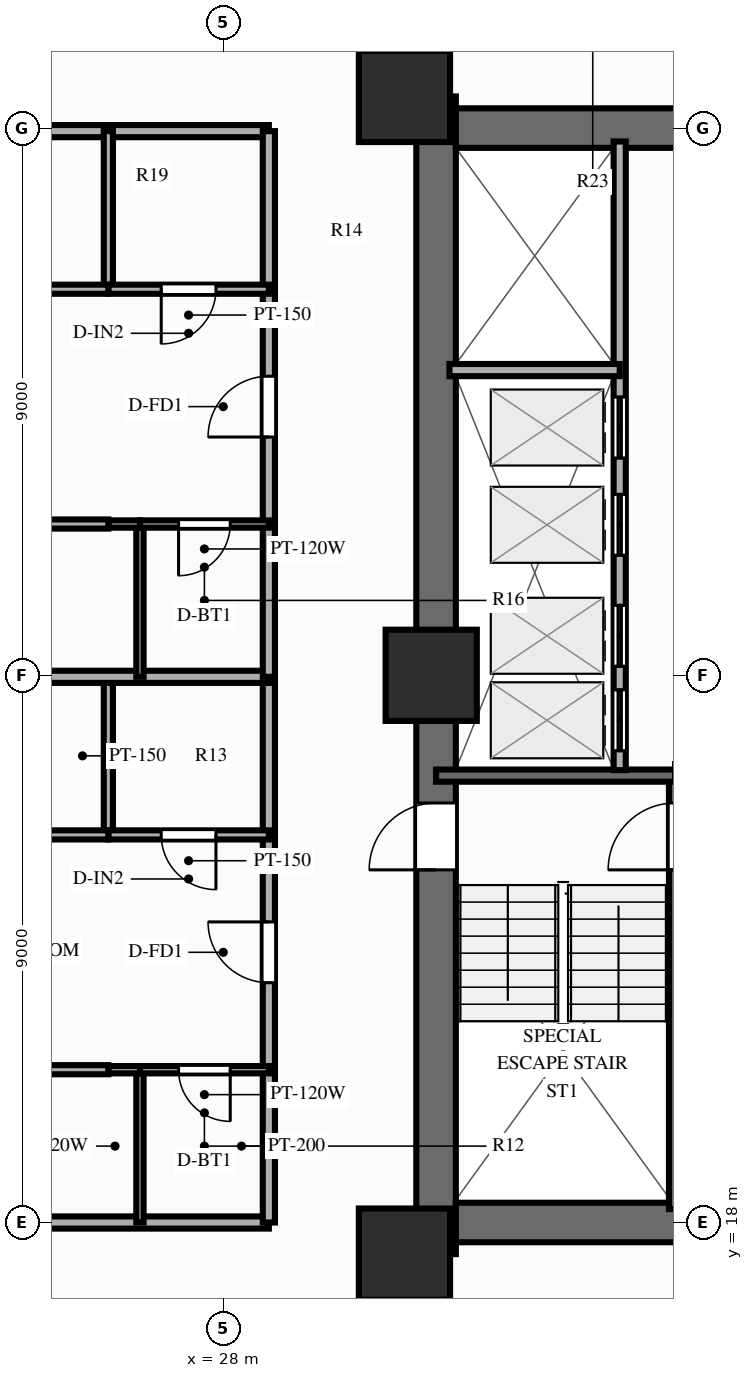
"""IFC4 building model, lengths in metres.
Left out: names, types, materials, properties, quantities, classifications, styles, units other than length and angle.
Written with IfcOpenShell. Run it as: python <this file> out.ifc"""

import sys

from ifc_helpers import new_model, si_unit, direction, frame, frame_2d, origin, origin_2d, place, context, subcontext, project, spatial, rectangle, extrude, source, transform, mapped, element, fill, save


model = new_model("IFC4")
c1 = context("Model", 3, precision=1e-05, world=origin(), true_north=direction((0.0, 1.0)))
c2 = subcontext(c1, "Body", "Model", "MODEL_VIEW")
j1 = project(units=[si_unit("LENGTHUNIT", "METRE"), si_unit("PLANEANGLEUNIT", "RADIAN")], contexts=[c1])
p1 = place(None, origin())
s1 = spatial("IfcSite", under=j1, at=p1, CompositionType="ELEMENT")
p2 = place(p1, origin())
s2 = spatial("IfcBuilding", under=s1, at=p2, CompositionType="ELEMENT")
p3 = place(p2, frame((0.0, 0.0, 49.4)))
s3 = spatial("IfcBuildingStorey", under=s2, at=p3, CompositionType="ELEMENT", Elevation=49.4)
p4 = place(p3, frame((31.5, 17.48, 0.0), z_axis=(0.0, 0.0, 1.0), x_axis=(0.0, 1.0, 0.0)))
e1 = element("IfcWall", 1, at=p4, inside=s3, PredefinedType="SHEAR", context=c2, shape_type="SweptSolid", body=[
    extrude(rectangle(XDim=19.04, YDim=0.65, at=frame_2d((9.52, 0.0))), origin(), (0.0, 0.0, 1.0), 3.0),
])
p5 = place(p4, frame((6.32, 0.0, 0.0)))
e2 = element("IfcOpeningElement", 2, at=p5, cuts=e1, PredefinedType="OPENING", context=c2, shape_type="SweptSolid", body=[
    extrude(rectangle(XDim=1.1, YDim=2.15, at=frame_2d((0.55, 1.075))), frame((0.0, 0.337, 0.0), z_axis=(0.0, -1.0, 0.0), x_axis=(1.0, 0.0, 0.0)), (0.0, 0.0, 1.0), 0.674),
])
p6 = place(p3, frame((31.825, 18.0, 0.0), z_axis=(0.0, 0.0, 1.0), x_axis=(1.0, 0.0, 0.0)))
e3 = element("IfcWall", 3, at=p6, inside=s3, PredefinedType="SHEAR", context=c2, shape_type="SweptSolid", body=[
    extrude(rectangle(XDim=12.35, YDim=0.65, at=frame_2d((6.175, 0.0))), origin(), (0.0, 0.0, 1.0), 3.0),
])
p7 = place(p3, frame((31.825, 36.0, 0.0), z_axis=(0.0, 0.0, 1.0), x_axis=(1.0, 0.0, 0.0)))
e4 = element("IfcWall", 4, at=p7, inside=s3, PredefinedType="SHEAR", context=c2, shape_type="SweptSolid", body=[
    extrude(rectangle(XDim=12.35, YDim=0.65, at=frame_2d((6.175, 0.0))), origin(), (0.0, 0.0, 1.0), 3.0),
])
p8 = place(p7, frame((5.125, 0.0, 0.0), z_axis=(0.0, 0.0, 1.0), x_axis=(-1.0, 0.0, 0.0)))
e5 = element("IfcOpeningElement", 5, at=p8, cuts=e4, PredefinedType="OPENING", context=c2, shape_type="SweptSolid", body=[
    extrude(rectangle(XDim=1.4, YDim=2.15, at=frame_2d((0.7, 1.075))), frame((0.0, 0.337, 0.0), z_axis=(0.0, -1.0, 0.0), x_axis=(1.0, 0.0, 0.0)), (0.0, 0.0, 1.0), 0.674),
])
m1 = source(origin(), c2, "Body", "SweptSolid", [
    extrude(rectangle(XDim=1.5, YDim=1.5, at=origin_2d()), origin(), (0.0, 0.0, 1.0), 3.0),
])
for number, where, z_axis, x_axis in (
    (6, (30.98, 17.48, 0.0), (0.0, 0.0, 1.0), (1.0, 0.0, 0.0)),
    (7, (30.98, 36.52, 0.0), (0.0, 0.0, 1.0), (1.0, 0.0, 0.0)),
    (8, (31.42, 27.0, 0.0), (0.0, 0.0, 1.0), (1.0, 0.0, 0.0)),
):
    element("IfcColumn", number, at=place(p3, frame(where, z_axis=z_axis, x_axis=x_axis)), inside=s3, PredefinedType="COLUMN", context=c2, shape_type="MappedRepresentation", body=[
        mapped(m1, transform((0.0, 0.0, 0.0), scale=1.0)),
    ])
p9 = place(p3, frame((35.43, 18.22, 0.0), z_axis=(0.0, 0.0, 1.0), x_axis=(0.0, 1.0, 0.0)))
e9 = element("IfcWall", 9, at=p9, inside=s3, PredefinedType="SOLIDWALL", context=c2, shape_type="SweptSolid", body=[
    extrude(rectangle(XDim=7.22, YDim=0.2, at=frame_2d((3.61, 0.0))), origin(), (0.0, 0.0, 1.0), 2.79),
])
p10 = place(p9, frame((6.68, 0.0, 0.0), z_axis=(0.0, 0.0, 1.0), x_axis=(-1.0, 0.0, 0.0)))
e10 = element("IfcOpeningElement", 10, at=p10, cuts=e9, PredefinedType="OPENING", context=c2, shape_type="SweptSolid", body=[
    extrude(rectangle(XDim=1.1, YDim=2.15, at=frame_2d((0.55, 1.075))), frame((0.0, 0.112, 0.0), z_axis=(0.0, -1.0, 0.0), x_axis=(1.0, 0.0, 0.0)), (0.0, 0.0, 1.0), 0.224),
])
p11 = place(p3, frame((31.5, 25.35, 0.0), z_axis=(0.0, 0.0, 1.0), x_axis=(1.0, 0.0, 0.0)))
e11 = element("IfcWall", 11, at=p11, inside=s3, PredefinedType="SOLIDWALL", context=c2, shape_type="SweptSolid", body=[
    extrude(rectangle(XDim=3.93, YDim=0.2, at=frame_2d((1.965, 0.0))), origin(), (0.0, 0.0, 1.0), 2.79),
])
p12 = place(p3, frame((34.52, 25.44, 0.0), z_axis=(0.0, 0.0, 1.0), x_axis=(0.0, 1.0, 0.0)))
e12 = element("IfcWall", 12, at=p12, inside=s3, PredefinedType="PARTITIONING", context=c2, shape_type="SweptSolid", body=[
    extrude(rectangle(XDim=10.34, YDim=0.2, at=frame_2d((5.17, 0.0))), origin(), (0.0, 0.0, 1.0), 2.79),
])
p13 = place(p12, frame((0.32, 0.0, 0.0)))
e13 = element("IfcOpeningElement", 13, at=p13, cuts=e12, PredefinedType="OPENING", context=c2, shape_type="SweptSolid", body=[
    extrude(rectangle(XDim=1.0, YDim=2.15, at=frame_2d((0.5, 1.075))), frame((0.0, 0.112, 0.0), z_axis=(0.0, -1.0, 0.0), x_axis=(1.0, 0.0, 0.0)), (0.0, 0.0, 1.0), 0.224),
])
p14 = place(p12, frame((1.71, 0.0, 0.0)))
e14 = element("IfcOpeningElement", 14, at=p14, cuts=e12, PredefinedType="OPENING", context=c2, shape_type="SweptSolid", body=[
    extrude(rectangle(XDim=1.0, YDim=2.15, at=frame_2d((0.5, 1.075))), frame((0.0, 0.112, 0.0), z_axis=(0.0, -1.0, 0.0), x_axis=(1.0, 0.0, 0.0)), (0.0, 0.0, 1.0), 0.224),
])
p15 = place(p12, frame((3.535, 0.0, 0.0)))
e15 = element("IfcOpeningElement", 15, at=p15, cuts=e12, PredefinedType="OPENING", context=c2, shape_type="SweptSolid", body=[
    extrude(rectangle(XDim=1.0, YDim=2.15, at=frame_2d((0.5, 1.075))), frame((0.0, 0.112, 0.0), z_axis=(0.0, -1.0, 0.0), x_axis=(1.0, 0.0, 0.0)), (0.0, 0.0, 1.0), 0.224),
])
p16 = place(p12, frame((5.135, 0.0, 0.0)))
e16 = element("IfcOpeningElement", 16, at=p16, cuts=e12, PredefinedType="OPENING", context=c2, shape_type="SweptSolid", body=[
    extrude(rectangle(XDim=1.0, YDim=2.15, at=frame_2d((0.5, 1.075))), frame((0.0, 0.112, 0.0), z_axis=(0.0, -1.0, 0.0), x_axis=(1.0, 0.0, 0.0)), (0.0, 0.0, 1.0), 0.224),
])
p17 = place(p3, frame((31.72, 32.02, 0.0), z_axis=(0.0, 0.0, 1.0), x_axis=(1.0, 0.0, 0.0)))
e17 = element("IfcWall", 17, at=p17, inside=s3, PredefinedType="PARTITIONING", context=c2, shape_type="SweptSolid", body=[
    extrude(rectangle(XDim=2.8, YDim=0.2, at=frame_2d((1.4, 0.0))), origin(), (0.0, 0.0, 1.0), 2.79),
])
for number, where, z_axis, x_axis in (
    (18, (28.75, 18.0, 0.0), (0.0, 0.0, 1.0), (-1.0, 0.0, 0.0)),
    (19, (28.75, 35.95, 0.0), (0.0, 0.0, 1.0), (-1.0, 0.0, 0.0)),
):
    element("IfcWall", number, at=place(p3, frame(where, z_axis=z_axis, x_axis=x_axis)), inside=s3, PredefinedType="PARTITIONING", context=c2, shape_type="SweptSolid", body=[
        extrude(rectangle(XDim=16.6, YDim=0.2, at=frame_2d((8.3, 0.0))), origin(), (0.0, 0.0, 1.0), 2.24),
    ])
p18 = place(p3, frame((28.75, 18.0, 0.0), z_axis=(0.0, 0.0, 1.0), x_axis=(0.0, 1.0, 0.0)))
e20 = element("IfcWall", 20, at=p18, inside=s3, PredefinedType="PARTITIONING", context=c2, shape_type="SweptSolid", body=[
    extrude(rectangle(XDim=2.513, YDim=0.2, at=frame_2d((1.256, 0.0))), origin(), (0.0, 0.0, 1.0), 2.79),
])
p19 = place(p3, frame((28.75, 20.513, 0.0), z_axis=(0.0, 0.0, 1.0), x_axis=(0.0, 1.0, 0.0)))
e21 = element("IfcWall", 21, at=p19, inside=s3, PredefinedType="PARTITIONING", context=c2, shape_type="SweptSolid", body=[
    extrude(rectangle(XDim=3.862, YDim=0.2, at=frame_2d((1.931, 0.0))), origin(), (0.0, 0.0, 1.0), 2.79),
])
p20 = place(p19, frame((1.431, 0.0, 0.0)))
e22 = element("IfcOpeningElement", 22, at=p20, cuts=e21, PredefinedType="OPENING", context=c2, shape_type="SweptSolid", body=[
    extrude(rectangle(XDim=1.0, YDim=2.15, at=frame_2d((0.5, 1.075))), frame((0.0, 0.112, 0.0), z_axis=(0.0, -1.0, 0.0), x_axis=(1.0, 0.0, 0.0)), (0.0, 0.0, 1.0), 0.224),
])
p21 = place(p3, frame((28.75, 24.375, 0.0), z_axis=(0.0, 0.0, 1.0), x_axis=(0.0, 1.0, 0.0)))
e23 = element("IfcWall", 23, at=p21, inside=s3, PredefinedType="PARTITIONING", context=c2, shape_type="SweptSolid", body=[
    extrude(rectangle(XDim=2.6, YDim=0.2, at=frame_2d((1.3, 0.0))), origin(), (0.0, 0.0, 1.0), 2.79),
])
p22 = place(p3, frame((26.63, 18.0, 0.0), z_axis=(0.0, 0.0, 1.0), x_axis=(0.0, 1.0, 0.0)))
e24 = element("IfcWall", 24, at=p22, inside=s3, PredefinedType="PARTITIONING", context=c2, shape_type="SweptSolid", body=[
    extrude(rectangle(XDim=2.513, YDim=0.12, at=frame_2d((1.256, 0.0))), origin(), (0.0, 0.0, 1.0), 2.79),
])
p23 = place(p3, frame((26.11, 24.375, 0.0), z_axis=(0.0, 0.0, 1.0), x_axis=(0.0, 1.0, 0.0)))
e25 = element("IfcWall", 25, at=p23, inside=s3, PredefinedType="PARTITIONING", context=c2, shape_type="SweptSolid", body=[
    extrude(rectangle(XDim=2.6, YDim=0.15, at=frame_2d((1.3, 0.0))), origin(), (0.0, 0.0, 1.0), 2.79),
])
p24 = place(p3, frame((28.75, 20.513, 0.0), z_axis=(0.0, 0.0, 1.0), x_axis=(-1.0, 0.0, 0.0)))
e26 = element("IfcWall", 26, at=p24, inside=s3, PredefinedType="PARTITIONING", context=c2, shape_type="SweptSolid", body=[
    extrude(rectangle(XDim=2.12, YDim=0.12, at=frame_2d((1.06, 0.0))), origin(), (0.0, 0.0, 1.0), 2.79),
])
p25 = place(p24, frame((0.635, 0.0, 0.0)))
e27 = element("IfcOpeningElement", 27, at=p25, cuts=e26, PredefinedType="OPENING", context=c2, shape_type="SweptSolid", body=[
    extrude(rectangle(XDim=0.85, YDim=2.05, at=frame_2d((0.425, 1.025))), frame((0.0, 0.072, 0.0), z_axis=(0.0, -1.0, 0.0), x_axis=(1.0, 0.0, 0.0)), (0.0, 0.0, 1.0), 0.144),
])
p26 = place(p3, frame((26.63, 20.513, 0.0), z_axis=(0.0, 0.0, 1.0), x_axis=(-1.0, 0.0, 0.0)))
e28 = element("IfcWall", 28, at=p26, inside=s3, PredefinedType="PARTITIONING", context=c2, shape_type="SweptSolid", body=[
    extrude(rectangle(XDim=0.52, YDim=0.12, at=frame_2d((0.26, 0.0))), origin(), (0.0, 0.0, 1.0), 2.79),
])
p27 = place(p3, frame((26.11, 20.513, 0.0), z_axis=(0.0, 0.0, 1.0), x_axis=(-1.0, 0.0, 0.0)))
e29 = element("IfcWall", 29, at=p27, inside=s3, PredefinedType="PARTITIONING", context=c2, shape_type="SweptSolid", body=[
    extrude(rectangle(XDim=13.96, YDim=0.15, at=frame_2d((6.98, 0.0))), origin(), (0.0, 0.0, 1.0), 2.79),
])
p28 = place(p27, frame((6.006, 0.0, 0.0)))
e30 = element("IfcOpeningElement", 30, at=p28, cuts=e29, PredefinedType="OPENING", context=c2, shape_type="SweptSolid", body=[
    extrude(rectangle(XDim=0.9, YDim=2.1, at=frame_2d((0.45, 1.05))), frame((0.0, 0.087, 0.0), z_axis=(0.0, -1.0, 0.0), x_axis=(1.0, 0.0, 0.0)), (0.0, 0.0, 1.0), 0.174),
])
p29 = place(p3, frame((28.75, 24.375, 0.0), z_axis=(0.0, 0.0, 1.0), x_axis=(-1.0, 0.0, 0.0)))
e31 = element("IfcWall", 31, at=p29, inside=s3, PredefinedType="PARTITIONING", context=c2, shape_type="SweptSolid", body=[
    extrude(rectangle(XDim=2.64, YDim=0.15, at=frame_2d((1.32, 0.0))), origin(), (0.0, 0.0, 1.0), 2.79),
])
p30 = place(p29, frame((0.87, 0.0, 0.0)))
e32 = element("IfcOpeningElement", 32, at=p30, cuts=e31, PredefinedType="OPENING", context=c2, shape_type="SweptSolid", body=[
    extrude(rectangle(XDim=0.9, YDim=2.1, at=frame_2d((0.45, 1.05))), frame((0.0, 0.087, 0.0), z_axis=(0.0, -1.0, 0.0), x_axis=(1.0, 0.0, 0.0)), (0.0, 0.0, 1.0), 0.174),
])
p31 = place(p3, frame((26.11, 24.375, 0.0), z_axis=(0.0, 0.0, 1.0), x_axis=(-1.0, 0.0, 0.0)))
e33 = element("IfcWall", 33, at=p31, inside=s3, PredefinedType="PARTITIONING", context=c2, shape_type="SweptSolid", body=[
    extrude(rectangle(XDim=13.96, YDim=0.15, at=frame_2d((6.98, 0.0))), origin(), (0.0, 0.0, 1.0), 2.79),
])
p32 = place(p31, frame((6.006, 0.0, 0.0)))
e34 = element("IfcOpeningElement", 34, at=p32, cuts=e33, PredefinedType="OPENING", context=c2, shape_type="SweptSolid", body=[
    extrude(rectangle(XDim=0.9, YDim=2.1, at=frame_2d((0.45, 1.05))), frame((0.0, 0.087, 0.0), z_axis=(0.0, -1.0, 0.0), x_axis=(1.0, 0.0, 0.0)), (0.0, 0.0, 1.0), 0.174),
])
p33 = place(p3, frame((28.75, 26.975, 0.0), z_axis=(0.0, 0.0, 1.0), x_axis=(-1.0, 0.0, 0.0)))
e35 = element("IfcWall", 35, at=p33, inside=s3, PredefinedType="PARTITIONING", context=c2, shape_type="SweptSolid", body=[
    extrude(rectangle(XDim=16.6, YDim=0.2, at=frame_2d((8.3, 0.0))), origin(), (0.0, 0.0, 1.0), 2.79),
])
p34 = place(p3, frame((28.75, 26.975, 0.0), z_axis=(0.0, 0.0, 1.0), x_axis=(0.0, 1.0, 0.0)))
e36 = element("IfcWall", 36, at=p34, inside=s3, PredefinedType="PARTITIONING", context=c2, shape_type="SweptSolid", body=[
    extrude(rectangle(XDim=2.513, YDim=0.2, at=frame_2d((1.256, 0.0))), origin(), (0.0, 0.0, 1.0), 2.79),
])
p35 = place(p3, frame((28.75, 29.488, 0.0), z_axis=(0.0, 0.0, 1.0), x_axis=(0.0, 1.0, 0.0)))
e37 = element("IfcWall", 37, at=p35, inside=s3, PredefinedType="PARTITIONING", context=c2, shape_type="SweptSolid", body=[
    extrude(rectangle(XDim=3.862, YDim=0.2, at=frame_2d((1.931, 0.0))), origin(), (0.0, 0.0, 1.0), 2.79),
])
p36 = place(p35, frame((1.431, 0.0, 0.0)))
e38 = element("IfcOpeningElement", 38, at=p36, cuts=e37, PredefinedType="OPENING", context=c2, shape_type="SweptSolid", body=[
    extrude(rectangle(XDim=1.0, YDim=2.15, at=frame_2d((0.5, 1.075))), frame((0.0, 0.112, 0.0), z_axis=(0.0, -1.0, 0.0), x_axis=(1.0, 0.0, 0.0)), (0.0, 0.0, 1.0), 0.224),
])
p37 = place(p3, frame((28.75, 33.35, 0.0), z_axis=(0.0, 0.0, 1.0), x_axis=(0.0, 1.0, 0.0)))
e39 = element("IfcWall", 39, at=p37, inside=s3, PredefinedType="PARTITIONING", context=c2, shape_type="SweptSolid", body=[
    extrude(rectangle(XDim=2.6, YDim=0.2, at=frame_2d((1.3, 0.0))), origin(), (0.0, 0.0, 1.0), 2.79),
])
p38 = place(p3, frame((26.63, 26.975, 0.0), z_axis=(0.0, 0.0, 1.0), x_axis=(0.0, 1.0, 0.0)))
e40 = element("IfcWall", 40, at=p38, inside=s3, PredefinedType="PARTITIONING", context=c2, shape_type="SweptSolid", body=[
    extrude(rectangle(XDim=2.513, YDim=0.12, at=frame_2d((1.256, 0.0))), origin(), (0.0, 0.0, 1.0), 2.79),
])
p39 = place(p3, frame((26.11, 33.35, 0.0), z_axis=(0.0, 0.0, 1.0), x_axis=(0.0, 1.0, 0.0)))
e41 = element("IfcWall", 41, at=p39, inside=s3, PredefinedType="PARTITIONING", context=c2, shape_type="SweptSolid", body=[
    extrude(rectangle(XDim=2.6, YDim=0.15, at=frame_2d((1.3, 0.0))), origin(), (0.0, 0.0, 1.0), 2.79),
])
p40 = place(p3, frame((28.75, 29.488, 0.0), z_axis=(0.0, 0.0, 1.0), x_axis=(-1.0, 0.0, 0.0)))
e42 = element("IfcWall", 42, at=p40, inside=s3, PredefinedType="PARTITIONING", context=c2, shape_type="SweptSolid", body=[
    extrude(rectangle(XDim=2.12, YDim=0.12, at=frame_2d((1.06, 0.0))), origin(), (0.0, 0.0, 1.0), 2.79),
])
p41 = place(p40, frame((0.635, 0.0, 0.0)))
e43 = element("IfcOpeningElement", 43, at=p41, cuts=e42, PredefinedType="OPENING", context=c2, shape_type="SweptSolid", body=[
    extrude(rectangle(XDim=0.85, YDim=2.05, at=frame_2d((0.425, 1.025))), frame((0.0, 0.072, 0.0), z_axis=(0.0, -1.0, 0.0), x_axis=(1.0, 0.0, 0.0)), (0.0, 0.0, 1.0), 0.144),
])
p42 = place(p3, frame((26.63, 29.488, 0.0), z_axis=(0.0, 0.0, 1.0), x_axis=(-1.0, 0.0, 0.0)))
e44 = element("IfcWall", 44, at=p42, inside=s3, PredefinedType="PARTITIONING", context=c2, shape_type="SweptSolid", body=[
    extrude(rectangle(XDim=0.52, YDim=0.12, at=frame_2d((0.26, 0.0))), origin(), (0.0, 0.0, 1.0), 2.79),
])
p43 = place(p3, frame((26.11, 29.488, 0.0), z_axis=(0.0, 0.0, 1.0), x_axis=(-1.0, 0.0, 0.0)))
e45 = element("IfcWall", 45, at=p43, inside=s3, PredefinedType="PARTITIONING", context=c2, shape_type="SweptSolid", body=[
    extrude(rectangle(XDim=13.96, YDim=0.15, at=frame_2d((6.98, 0.0))), origin(), (0.0, 0.0, 1.0), 2.79),
])
p44 = place(p43, frame((6.006, 0.0, 0.0)))
e46 = element("IfcOpeningElement", 46, at=p44, cuts=e45, PredefinedType="OPENING", context=c2, shape_type="SweptSolid", body=[
    extrude(rectangle(XDim=0.9, YDim=2.1, at=frame_2d((0.45, 1.05))), frame((0.0, 0.087, 0.0), z_axis=(0.0, -1.0, 0.0), x_axis=(1.0, 0.0, 0.0)), (0.0, 0.0, 1.0), 0.174),
])
p45 = place(p3, frame((28.75, 33.35, 0.0), z_axis=(0.0, 0.0, 1.0), x_axis=(-1.0, 0.0, 0.0)))
e47 = element("IfcWall", 47, at=p45, inside=s3, PredefinedType="PARTITIONING", context=c2, shape_type="SweptSolid", body=[
    extrude(rectangle(XDim=2.64, YDim=0.15, at=frame_2d((1.32, 0.0))), origin(), (0.0, 0.0, 1.0), 2.79),
])
p46 = place(p45, frame((0.87, 0.0, 0.0)))
e48 = element("IfcOpeningElement", 48, at=p46, cuts=e47, PredefinedType="OPENING", context=c2, shape_type="SweptSolid", body=[
    extrude(rectangle(XDim=0.9, YDim=2.1, at=frame_2d((0.45, 1.05))), frame((0.0, 0.087, 0.0), z_axis=(0.0, -1.0, 0.0), x_axis=(1.0, 0.0, 0.0)), (0.0, 0.0, 1.0), 0.174),
])
p47 = place(p3, frame((26.11, 33.35, 0.0), z_axis=(0.0, 0.0, 1.0), x_axis=(-1.0, 0.0, 0.0)))
e49 = element("IfcWall", 49, at=p47, inside=s3, PredefinedType="PARTITIONING", context=c2, shape_type="SweptSolid", body=[
    extrude(rectangle(XDim=13.96, YDim=0.15, at=frame_2d((6.98, 0.0))), origin(), (0.0, 0.0, 1.0), 2.79),
])
p48 = place(p47, frame((6.006, 0.0, 0.0)))
e50 = element("IfcOpeningElement", 50, at=p48, cuts=e49, PredefinedType="OPENING", context=c2, shape_type="SweptSolid", body=[
    extrude(rectangle(XDim=0.9, YDim=2.1, at=frame_2d((0.45, 1.05))), frame((0.0, 0.087, 0.0), z_axis=(0.0, -1.0, 0.0), x_axis=(1.0, 0.0, 0.0)), (0.0, 0.0, 1.0), 0.174),
])
m2 = source(origin(), c2, "Body", "SweptSolid", [
    extrude(rectangle(XDim=1.1, YDim=2.15, at=frame_2d((0.55, 1.075))), frame((0.0, 0.025, 0.0), z_axis=(0.0, -1.0, 0.0), x_axis=(1.0, 0.0, 0.0)), (0.0, 0.0, 1.0), 0.05),
])
p49 = place(p5, origin())
e51 = element("IfcDoor", 51, at=p49, inside=s3, OperationType="SINGLE_SWING_LEFT", PredefinedType="DOOR", context=c2, shape_type="MappedRepresentation", body=[
    mapped(m2, transform((0.0, 0.0, 0.0), scale=1.0)),
])
fill(e2, e51)
m3 = source(origin(), c2, "Body", "SweptSolid", [
    extrude(rectangle(XDim=1.0, YDim=2.15, at=frame_2d((0.5, 1.075))), frame((0.0, 0.025, 0.0), z_axis=(0.0, -1.0, 0.0), x_axis=(1.0, 0.0, 0.0)), (0.0, 0.0, 1.0), 0.05),
])
p50 = place(p13, origin())
e52 = element("IfcDoor", 52, at=p50, inside=s3, OperationType="DOUBLE_DOOR_SLIDING", PredefinedType="DOOR", context=c2, shape_type="MappedRepresentation", body=[
    mapped(m3, transform((0.0, 0.0, 0.0), scale=1.0)),
])
fill(e13, e52)
p51 = place(p14, origin())
e53 = element("IfcDoor", 53, at=p51, inside=s3, OperationType="DOUBLE_DOOR_SLIDING", PredefinedType="DOOR", context=c2, shape_type="MappedRepresentation", body=[
    mapped(m3, transform((0.0, 0.0, 0.0), scale=1.0)),
])
fill(e14, e53)
p52 = place(p15, origin())
e54 = element("IfcDoor", 54, at=p52, inside=s3, OperationType="DOUBLE_DOOR_SLIDING", PredefinedType="DOOR", context=c2, shape_type="MappedRepresentation", body=[
    mapped(m3, transform((0.0, 0.0, 0.0), scale=1.0)),
])
fill(e15, e54)
p53 = place(p16, origin())
e55 = element("IfcDoor", 55, at=p53, inside=s3, OperationType="DOUBLE_DOOR_SLIDING", PredefinedType="DOOR", context=c2, shape_type="MappedRepresentation", body=[
    mapped(m3, transform((0.0, 0.0, 0.0), scale=1.0)),
])
fill(e16, e55)
p54 = place(p20, origin())
e56 = element("IfcDoor", 56, at=p54, inside=s3, OperationType="SINGLE_SWING_RIGHT", PredefinedType="DOOR", context=c2, shape_type="MappedRepresentation", body=[
    mapped(m3, transform((0.0, 0.0, 0.0), scale=1.0)),
])
fill(e22, e56)
m4 = source(origin(), c2, "Body", "SweptSolid", [
    extrude(rectangle(XDim=0.85, YDim=2.05, at=frame_2d((0.425, 1.025))), frame((0.0, 0.025, 0.0), z_axis=(0.0, -1.0, 0.0), x_axis=(1.0, 0.0, 0.0)), (0.0, 0.0, 1.0), 0.05),
])
p55 = place(p25, origin())
e57 = element("IfcDoor", 57, at=p55, inside=s3, OperationType="SINGLE_SWING_LEFT", PredefinedType="DOOR", context=c2, shape_type="MappedRepresentation", body=[
    mapped(m4, transform((0.0, 0.0, 0.0), scale=1.0)),
])
fill(e27, e57)
m5 = source(origin(), c2, "Body", "SweptSolid", [
    extrude(rectangle(XDim=0.9, YDim=2.1, at=frame_2d((0.45, 1.05))), frame((0.0, 0.025, 0.0), z_axis=(0.0, -1.0, 0.0), x_axis=(1.0, 0.0, 0.0)), (0.0, 0.0, 1.0), 0.05),
])
p56 = place(p30, origin())
e58 = element("IfcDoor", 58, at=p56, inside=s3, OperationType="SINGLE_SWING_LEFT", PredefinedType="DOOR", context=c2, shape_type="MappedRepresentation", body=[
    mapped(m5, transform((0.0, 0.0, 0.0), scale=1.0)),
])
fill(e32, e58)
p57 = place(p36, origin())
e59 = element("IfcDoor", 59, at=p57, inside=s3, OperationType="SINGLE_SWING_LEFT", PredefinedType="DOOR", context=c2, shape_type="MappedRepresentation", body=[
    mapped(m3, transform((0.0, 0.0, 0.0), scale=1.0)),
])
fill(e38, e59)
p58 = place(p41, origin())
e60 = element("IfcDoor", 60, at=p58, inside=s3, OperationType="SINGLE_SWING_RIGHT", PredefinedType="DOOR", context=c2, shape_type="MappedRepresentation", body=[
    mapped(m4, transform((0.0, 0.0, 0.0), scale=1.0)),
])
fill(e43, e60)
p59 = place(p46, origin())
e61 = element("IfcDoor", 61, at=p59, inside=s3, OperationType="SINGLE_SWING_RIGHT", PredefinedType="DOOR", context=c2, shape_type="MappedRepresentation", body=[
    mapped(m5, transform((0.0, 0.0, 0.0), scale=1.0)),
])
fill(e48, e61)
save(model, sys.argv[1])
